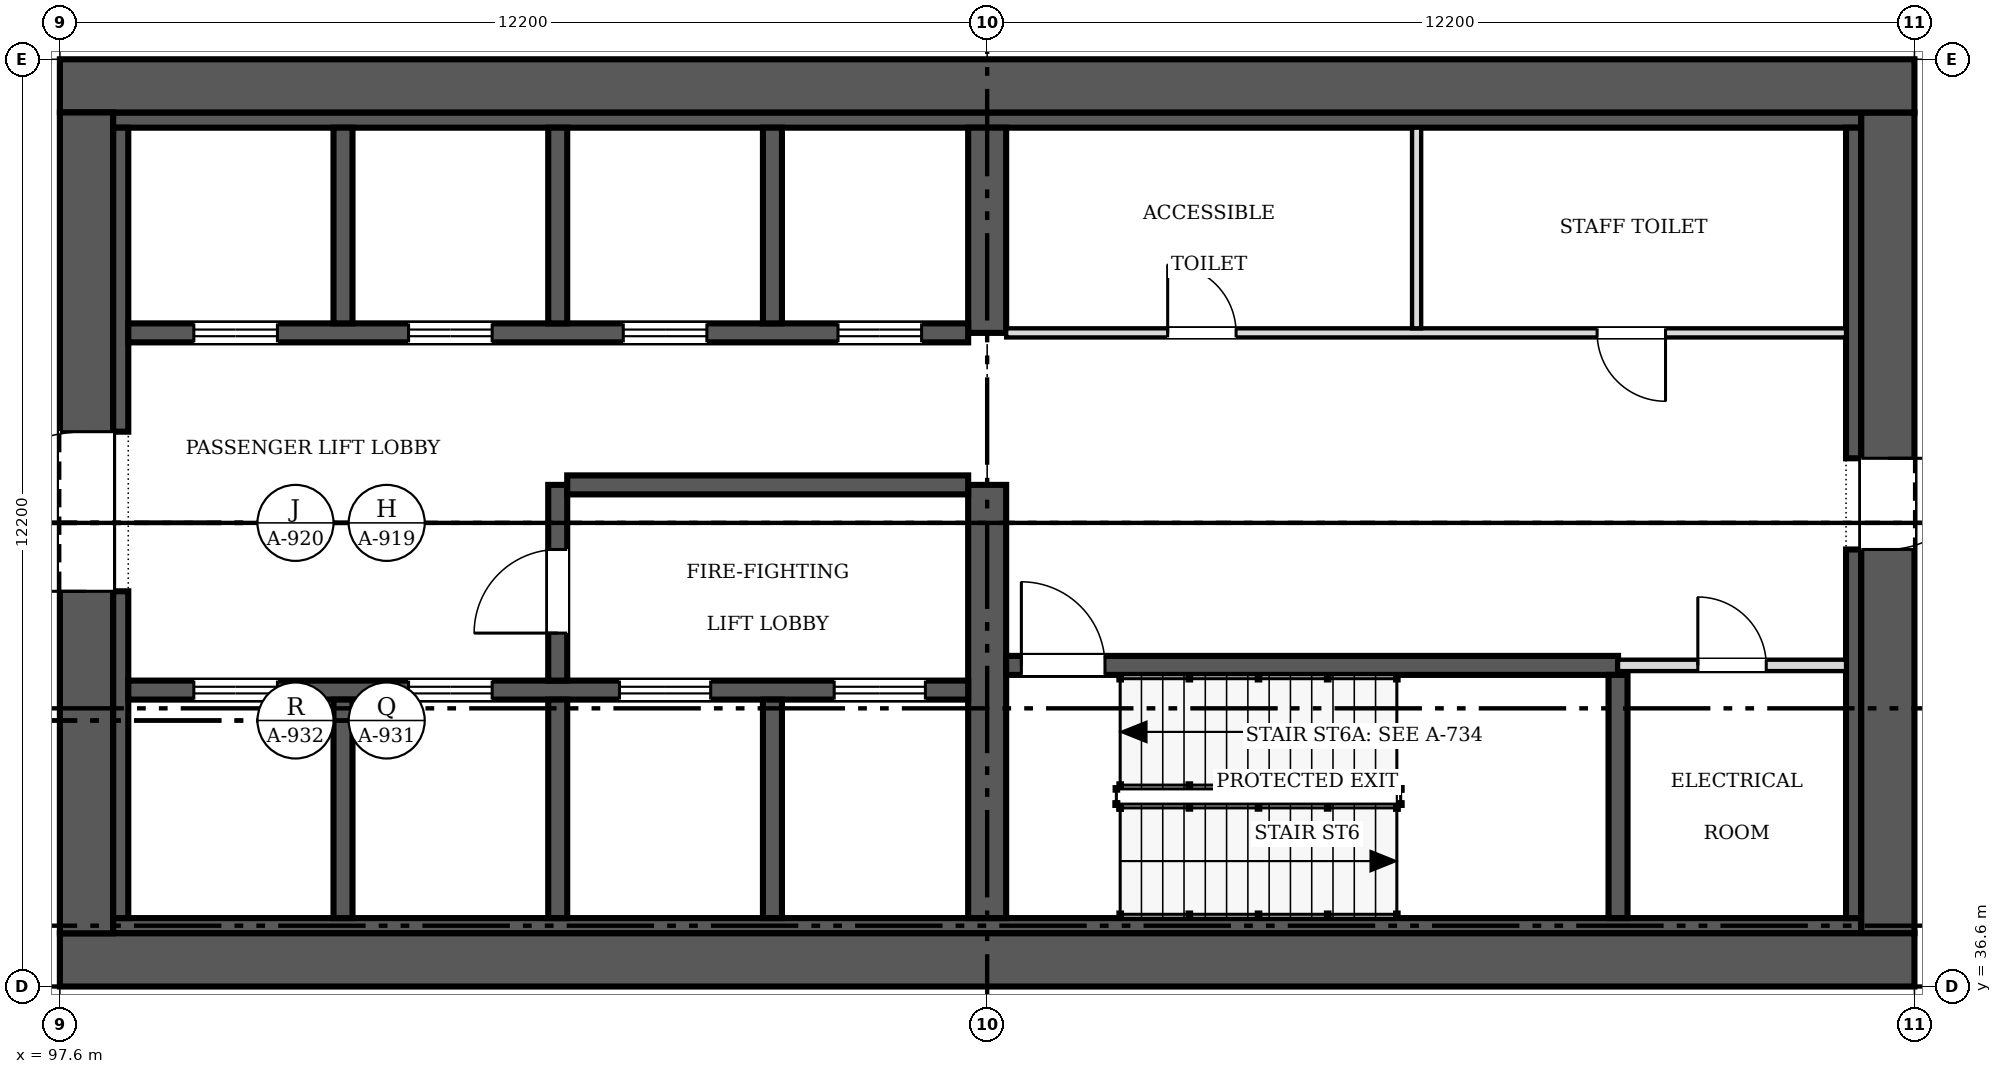
"""IFC4 building model, lengths in metres.
Left out: names, types, materials, properties, quantities, classifications, styles, units other than length and angle.
Written with IfcOpenShell. Run it as: python <this file> out.ifc"""

import sys

from ifc_helpers import new_model, si_unit, direction, frame, frame_2d, origin, place, context, subcontext, project, spatial, rectangle, extrude, source, transform, mapped, element, fill, save


model = new_model("IFC4")
c1 = context("Model", 3, precision=1e-05, world=origin(), true_north=direction((0.0, 1.0)))
c2 = subcontext(c1, "Body", "Model", "MODEL_VIEW")
j1 = project(units=[si_unit("LENGTHUNIT", "METRE"), si_unit("PLANEANGLEUNIT", "RADIAN")], contexts=[c1])
p1 = place(None, origin())
s1 = spatial("IfcSite", under=j1, at=p1, CompositionType="ELEMENT")
p2 = place(p1, origin())
s2 = spatial("IfcBuilding", under=s1, at=p2, CompositionType="ELEMENT")
p3 = place(p2, frame((0.0, 0.0, 12.0)))
s3 = spatial("IfcBuildingStorey", under=s2, at=p3, CompositionType="ELEMENT", Elevation=12.0)
p4 = place(p3, frame((122.0, 36.95, 0.0), z_axis=(0.0, 0.0, 1.0), x_axis=(-1.0, 0.0, 0.0)))
e1 = element("IfcWall", 1, at=p4, inside=s3, PredefinedType="SHEAR", context=c2, shape_type="SweptSolid", body=[
    extrude(rectangle(XDim=24.4, YDim=0.7, at=frame_2d((12.2, 0.0))), origin(), (0.0, 0.0, 1.0), 4.8),
])
p5 = place(p3, frame((97.95, 37.3, 0.0), z_axis=(0.0, 0.0, 1.0), x_axis=(0.0, 1.0, 0.0)))
e2 = element("IfcWall", 2, at=p5, inside=s3, PredefinedType="SHEAR", context=c2, shape_type="SweptSolid", body=[
    extrude(rectangle(XDim=10.8, YDim=0.7, at=frame_2d((5.4, 0.0))), origin(), (0.0, 0.0, 1.0), 4.8),
])
m1 = source(origin(), c2, "Body", "SweptSolid", [
    extrude(rectangle(XDim=2.1, YDim=2.4, at=frame_2d((1.05, 1.2))), frame((0.0, 0.36, 0.0), z_axis=(0.0, -1.0, 0.0), x_axis=(1.0, 0.0, 0.0)), (0.0, 0.0, 1.0), 0.72),
])
p6 = place(p5, frame((4.5, 0.0, 0.0)))
e3 = element("IfcOpeningElement", 3, at=p6, cuts=e2, PredefinedType="OPENING", context=c2, shape_type="MappedRepresentation", body=[
    mapped(m1, transform((0.0, 0.0, 0.0), scale=1.0)),
])
p7 = place(p3, frame((97.6, 48.45, 0.0), z_axis=(0.0, 0.0, 1.0), x_axis=(1.0, 0.0, 0.0)))
e4 = element("IfcWall", 4, at=p7, inside=s3, PredefinedType="SHEAR", context=c2, shape_type="SweptSolid", body=[
    extrude(rectangle(XDim=24.4, YDim=0.7, at=frame_2d((12.2, 0.0))), origin(), (0.0, 0.0, 1.0), 4.8),
])
p8 = place(p3, frame((121.65, 48.1, 0.0), z_axis=(0.0, 0.0, 1.0), x_axis=(0.0, -1.0, 0.0)))
e5 = element("IfcWall", 5, at=p8, inside=s3, PredefinedType="SHEAR", context=c2, shape_type="SweptSolid", body=[
    extrude(rectangle(XDim=10.8, YDim=0.7, at=frame_2d((5.4, 0.0))), origin(), (0.0, 0.0, 1.0), 4.8),
])
m2 = source(origin(), c2, "Body", "SweptSolid", [
    extrude(rectangle(XDim=1.2, YDim=2.1, at=frame_2d((0.6, 1.05))), frame((0.0, 0.36, 0.0), z_axis=(0.0, -1.0, 0.0), x_axis=(1.0, 0.0, 0.0)), (0.0, 0.0, 1.0), 0.72),
])
p9 = place(p8, frame((4.55, 0.0, 0.0)))
e6 = element("IfcOpeningElement", 6, at=p9, cuts=e5, PredefinedType="OPENING", context=c2, shape_type="MappedRepresentation", body=[
    mapped(m2, transform((0.0, 0.0, 0.0), scale=1.0)),
])
for number, where, z_axis, x_axis in (
    (7, (98.3, 37.4, 0.0), (0.0, 0.0, 1.0), (1.0, 0.0, 0.0)),
    (8, (98.3, 48.0, 0.0), (0.0, 0.0, 1.0), (1.0, 0.0, 0.0)),
):
    element("IfcWall", number, at=place(p3, frame(where, z_axis=z_axis, x_axis=x_axis)), inside=s3, PredefinedType="SOLIDWALL", context=c2, shape_type="SweptSolid", body=[
        extrude(rectangle(XDim=23.0, YDim=0.2, at=frame_2d((11.5, 0.0))), origin(), (0.0, 0.0, 1.0), 4.8),
    ])
p10 = place(p3, frame((98.4, 37.5, 0.0), z_axis=(0.0, 0.0, 1.0), x_axis=(0.0, 1.0, 0.0)))
e9 = element("IfcWall", 9, at=p10, inside=s3, PredefinedType="SOLIDWALL", context=c2, shape_type="SweptSolid", body=[
    extrude(rectangle(XDim=4.3, YDim=0.2, at=frame_2d((2.15, 0.0))), origin(), (0.0, 0.0, 1.0), 4.8),
])
p11 = place(p3, frame((98.4, 43.9, 0.0), z_axis=(0.0, 0.0, 1.0), x_axis=(0.0, 1.0, 0.0)))
e10 = element("IfcWall", 10, at=p11, inside=s3, PredefinedType="SOLIDWALL", context=c2, shape_type="SweptSolid", body=[
    extrude(rectangle(XDim=4.0, YDim=0.2, at=frame_2d((2.0, 0.0))), origin(), (0.0, 0.0, 1.0), 4.8),
])
p12 = place(p3, frame((121.2, 37.5, 0.0), z_axis=(0.0, 0.0, 1.0), x_axis=(0.0, 1.0, 0.0)))
e11 = element("IfcWall", 11, at=p12, inside=s3, PredefinedType="SOLIDWALL", context=c2, shape_type="SweptSolid", body=[
    extrude(rectangle(XDim=4.85, YDim=0.2, at=frame_2d((2.425, 0.0))), origin(), (0.0, 0.0, 1.0), 4.8),
])
p13 = place(p3, frame((121.2, 43.55, 0.0), z_axis=(0.0, 0.0, 1.0), x_axis=(0.0, 1.0, 0.0)))
e12 = element("IfcWall", 12, at=p13, inside=s3, PredefinedType="SOLIDWALL", context=c2, shape_type="SweptSolid", body=[
    extrude(rectangle(XDim=4.35, YDim=0.2, at=frame_2d((2.175, 0.0))), origin(), (0.0, 0.0, 1.0), 4.8),
])
p14 = place(p3, frame((109.8, 37.5, 0.0), z_axis=(0.0, 0.0, 1.0), x_axis=(0.0, 1.0, 0.0)))
e13 = element("IfcWall", 13, at=p14, inside=s3, PredefinedType="SHEAR", context=c2, shape_type="SweptSolid", body=[
    extrude(rectangle(XDim=5.7, YDim=0.5, at=frame_2d((2.85, 0.0))), origin(), (0.0, 0.0, 1.0), 4.8),
])
p15 = place(p3, frame((109.8, 45.2, 0.0), z_axis=(0.0, 0.0, 1.0), x_axis=(0.0, 1.0, 0.0)))
e14 = element("IfcWall", 14, at=p15, inside=s3, PredefinedType="SHEAR", context=c2, shape_type="SweptSolid", body=[
    extrude(rectangle(XDim=2.7, YDim=0.5, at=frame_2d((1.35, 0.0))), origin(), (0.0, 0.0, 1.0), 4.8),
])
p16 = place(p3, frame((98.5, 40.5, 0.0), z_axis=(0.0, 0.0, 1.0), x_axis=(1.0, 0.0, 0.0)))
e15 = element("IfcWall", 15, at=p16, inside=s3, PredefinedType="SOLIDWALL", context=c2, shape_type="SweptSolid", body=[
    extrude(rectangle(XDim=11.05, YDim=0.25, at=frame_2d((5.525, 0.0))), origin(), (0.0, 0.0, 1.0), 4.8),
])
m3 = source(origin(), c2, "Body", "SweptSolid", [
    extrude(rectangle(XDim=1.1, YDim=2.1, at=frame_2d((0.55, 1.05))), frame((0.0, 0.135, 0.0), z_axis=(0.0, -1.0, 0.0), x_axis=(1.0, 0.0, 0.0)), (0.0, 0.0, 1.0), 0.27),
])
p17 = place(p16, frame((0.863, 0.0, 0.0)))
e16 = element("IfcOpeningElement", 16, at=p17, cuts=e15, PredefinedType="OPENING", context=c2, shape_type="MappedRepresentation", body=[
    mapped(m3, transform((0.0, 0.0, 0.0), scale=1.0)),
])
p18 = place(p16, frame((3.688, 0.0, 0.0)))
e17 = element("IfcOpeningElement", 17, at=p18, cuts=e15, PredefinedType="OPENING", context=c2, shape_type="MappedRepresentation", body=[
    mapped(m3, transform((0.0, 0.0, 0.0), scale=1.0)),
])
m4 = source(origin(), c2, "Body", "SweptSolid", [
    extrude(rectangle(XDim=1.2, YDim=2.1, at=frame_2d((0.6, 1.05))), frame((0.0, 0.135, 0.0), z_axis=(0.0, -1.0, 0.0), x_axis=(1.0, 0.0, 0.0)), (0.0, 0.0, 1.0), 0.27),
])
p19 = place(p16, frame((6.462, 0.0, 0.0)))
e18 = element("IfcOpeningElement", 18, at=p19, cuts=e15, PredefinedType="OPENING", context=c2, shape_type="MappedRepresentation", body=[
    mapped(m4, transform((0.0, 0.0, 0.0), scale=1.0)),
])
p20 = place(p16, frame((9.288, 0.0, 0.0)))
e19 = element("IfcOpeningElement", 19, at=p20, cuts=e15, PredefinedType="OPENING", context=c2, shape_type="MappedRepresentation", body=[
    mapped(m4, transform((0.0, 0.0, 0.0), scale=1.0)),
])
p21 = place(p3, frame((109.55, 45.2, 0.0), z_axis=(0.0, 0.0, 1.0), x_axis=(-1.0, 0.0, 0.0)))
e20 = element("IfcWall", 20, at=p21, inside=s3, PredefinedType="SOLIDWALL", context=c2, shape_type="SweptSolid", body=[
    extrude(rectangle(XDim=11.05, YDim=0.25, at=frame_2d((5.525, 0.0))), origin(), (0.0, 0.0, 1.0), 4.8),
])
p22 = place(p21, frame((9.087, 0.0, 0.0)))
e21 = element("IfcOpeningElement", 21, at=p22, cuts=e20, PredefinedType="OPENING", context=c2, shape_type="MappedRepresentation", body=[
    mapped(m3, transform((0.0, 0.0, 0.0), scale=1.0)),
])
p23 = place(p21, frame((6.262, 0.0, 0.0)))
e22 = element("IfcOpeningElement", 22, at=p23, cuts=e20, PredefinedType="OPENING", context=c2, shape_type="MappedRepresentation", body=[
    mapped(m3, transform((0.0, 0.0, 0.0), scale=1.0)),
])
p24 = place(p21, frame((3.438, 0.0, 0.0)))
e23 = element("IfcOpeningElement", 23, at=p24, cuts=e20, PredefinedType="OPENING", context=c2, shape_type="MappedRepresentation", body=[
    mapped(m3, transform((0.0, 0.0, 0.0), scale=1.0)),
])
p25 = place(p21, frame((0.613, 0.0, 0.0)))
e24 = element("IfcOpeningElement", 24, at=p25, cuts=e20, PredefinedType="OPENING", context=c2, shape_type="MappedRepresentation", body=[
    mapped(m3, transform((0.0, 0.0, 0.0), scale=1.0)),
])
p26 = place(p3, frame((118.1, 40.825, 0.0), z_axis=(0.0, 0.0, 1.0), x_axis=(-1.0, 0.0, 0.0)))
e25 = element("IfcWall", 25, at=p26, inside=s3, PredefinedType="SOLIDWALL", context=c2, shape_type="SweptSolid", body=[
    extrude(rectangle(XDim=8.05, YDim=0.25, at=frame_2d((4.025, 0.0))), origin(), (0.0, 0.0, 1.0), 4.8),
])
p27 = place(p26, frame((6.75, 0.0, 0.0)))
e26 = element("IfcOpeningElement", 26, at=p27, cuts=e25, PredefinedType="OPENING", context=c2, shape_type="MappedRepresentation", body=[
    mapped(m3, transform((0.0, 0.0, 0.0), scale=1.0)),
])
p28 = place(p3, frame((104.15, 37.5, 0.0), z_axis=(0.0, 0.0, 1.0), x_axis=(0.0, 1.0, 0.0)))
e27 = element("IfcWall", 27, at=p28, inside=s3, PredefinedType="SOLIDWALL", context=c2, shape_type="SweptSolid", body=[
    extrude(rectangle(XDim=2.875, YDim=0.25, at=frame_2d((1.438, 0.0))), origin(), (0.0, 0.0, 1.0), 4.8),
])
p29 = place(p3, frame((104.15, 43.2, 0.0), z_axis=(0.0, 0.0, 1.0), x_axis=(0.0, -1.0, 0.0)))
e28 = element("IfcWall", 28, at=p29, inside=s3, PredefinedType="SOLIDWALL", context=c2, shape_type="SweptSolid", body=[
    extrude(rectangle(XDim=2.575, YDim=0.25, at=frame_2d((1.288, 0.0))), origin(), (0.0, 0.0, 1.0), 4.8),
])
p30 = place(p29, frame((0.85, 0.0, 0.0)))
e29 = element("IfcOpeningElement", 29, at=p30, cuts=e28, PredefinedType="OPENING", context=c2, shape_type="MappedRepresentation", body=[
    mapped(m3, transform((0.0, 0.0, 0.0), scale=1.0)),
])
p31 = place(p3, frame((104.275, 43.2, 0.0), z_axis=(0.0, 0.0, 1.0), x_axis=(1.0, 0.0, 0.0)))
e30 = element("IfcWall", 30, at=p31, inside=s3, PredefinedType="SOLIDWALL", context=c2, shape_type="SweptSolid", body=[
    extrude(rectangle(XDim=5.275, YDim=0.25, at=frame_2d((2.638, 0.0))), origin(), (0.0, 0.0, 1.0), 4.8),
])
p32 = place(p3, frame((118.1, 37.5, 0.0), z_axis=(0.0, 0.0, 1.0), x_axis=(0.0, 1.0, 0.0)))
e31 = element("IfcWall", 31, at=p32, inside=s3, PredefinedType="SOLIDWALL", context=c2, shape_type="SweptSolid", body=[
    extrude(rectangle(XDim=3.2, YDim=0.25, at=frame_2d((1.6, 0.0))), origin(), (0.0, 0.0, 1.0), 4.8),
])
for number, where, z_axis, x_axis in (
    (32, (101.325, 37.5, 0.0), (0.0, 0.0, 1.0), (0.0, 1.0, 0.0)),
    (33, (106.975, 37.5, 0.0), (0.0, 0.0, 1.0), (0.0, 1.0, 0.0)),
):
    element("IfcWall", number, at=place(p3, frame(where, z_axis=z_axis, x_axis=x_axis)), inside=s3, PredefinedType="SOLIDWALL", context=c2, shape_type="SweptSolid", body=[
        extrude(rectangle(XDim=2.875, YDim=0.25, at=frame_2d((1.438, 0.0))), origin(), (0.0, 0.0, 1.0), 4.8),
    ])
for number, where, z_axis, x_axis in (
    (34, (101.325, 45.325, 0.0), (0.0, 0.0, 1.0), (0.0, 1.0, 0.0)),
    (35, (104.15, 45.325, 0.0), (0.0, 0.0, 1.0), (0.0, 1.0, 0.0)),
    (36, (106.975, 45.325, 0.0), (0.0, 0.0, 1.0), (0.0, 1.0, 0.0)),
):
    element("IfcWall", number, at=place(p3, frame(where, z_axis=z_axis, x_axis=x_axis)), inside=s3, PredefinedType="SOLIDWALL", context=c2, shape_type="SweptSolid", body=[
        extrude(rectangle(XDim=2.575, YDim=0.25, at=frame_2d((1.288, 0.0))), origin(), (0.0, 0.0, 1.0), 4.8),
    ])
p33 = place(p3, frame((110.05, 45.2, 0.0), z_axis=(0.0, 0.0, 1.0), x_axis=(1.0, 0.0, 0.0)))
e37 = element("IfcWall", 37, at=p33, inside=s3, PredefinedType="PARTITIONING", context=c2, shape_type="SweptSolid", body=[
    extrude(rectangle(XDim=11.05, YDim=0.12, at=frame_2d((5.525, 0.0))), origin(), (0.0, 0.0, 1.0), 4.6),
])
m5 = source(origin(), c2, "Body", "SweptSolid", [
    extrude(rectangle(XDim=0.9, YDim=2.1, at=frame_2d((0.45, 1.05))), frame((0.0, 0.07, 0.0), z_axis=(0.0, -1.0, 0.0), x_axis=(1.0, 0.0, 0.0)), (0.0, 0.0, 1.0), 0.14),
])
p34 = place(p33, frame((2.125, 0.0, 0.0)))
e38 = element("IfcOpeningElement", 38, at=p34, cuts=e37, PredefinedType="OPENING", context=c2, shape_type="MappedRepresentation", body=[
    mapped(m5, transform((0.0, 0.0, 0.0), scale=1.0)),
])
p35 = place(p33, frame((7.775, 0.0, 0.0)))
e39 = element("IfcOpeningElement", 39, at=p35, cuts=e37, PredefinedType="OPENING", context=c2, shape_type="MappedRepresentation", body=[
    mapped(m5, transform((0.0, 0.0, 0.0), scale=1.0)),
])
p36 = place(p3, frame((121.1, 40.825, 0.0), z_axis=(0.0, 0.0, 1.0), x_axis=(-1.0, 0.0, 0.0)))
e40 = element("IfcWall", 40, at=p36, inside=s3, PredefinedType="PARTITIONING", context=c2, shape_type="SweptSolid", body=[
    extrude(rectangle(XDim=3.0, YDim=0.15, at=frame_2d((1.5, 0.0))), origin(), (0.0, 0.0, 1.0), 4.6),
])
m6 = source(origin(), c2, "Body", "SweptSolid", [
    extrude(rectangle(XDim=0.9, YDim=2.1, at=frame_2d((0.45, 1.05))), frame((0.0, 0.085, 0.0), z_axis=(0.0, -1.0, 0.0), x_axis=(1.0, 0.0, 0.0)), (0.0, 0.0, 1.0), 0.17),
])
p37 = place(p36, frame((1.05, 0.0, 0.0)))
e41 = element("IfcOpeningElement", 41, at=p37, cuts=e40, PredefinedType="OPENING", context=c2, shape_type="MappedRepresentation", body=[
    mapped(m6, transform((0.0, 0.0, 0.0), scale=1.0)),
])
p38 = place(p3, frame((115.45, 45.26, 0.0), z_axis=(0.0, 0.0, 1.0), x_axis=(0.0, 1.0, 0.0)))
e42 = element("IfcWall", 42, at=p38, inside=s3, PredefinedType="PARTITIONING", context=c2, shape_type="SweptSolid", body=[
    extrude(rectangle(XDim=2.64, YDim=0.12, at=frame_2d((1.32, 0.0))), origin(), (0.0, 0.0, 1.0), 4.6),
])
m7 = source(origin(), c2, "Body", "SweptSolid", [
    extrude(rectangle(XDim=2.1, YDim=2.4, at=frame_2d((1.05, 1.2))), frame((0.0, 0.025, 0.0), z_axis=(0.0, -1.0, 0.0), x_axis=(1.0, 0.0, 0.0)), (0.0, 0.0, 1.0), 0.05),
])
p39 = place(p6, origin())
e43 = element("IfcDoor", 43, at=p39, inside=s3, OperationType="DOUBLE_DOOR_SINGLE_SWING", PredefinedType="DOOR", context=c2, shape_type="MappedRepresentation", body=[
    mapped(m7, transform((0.0, 0.0, 0.0), scale=1.0)),
])
fill(e3, e43)
m8 = source(origin(), c2, "Body", "SweptSolid", [
    extrude(rectangle(XDim=1.2, YDim=2.1, at=frame_2d((0.6, 1.05))), frame((0.0, 0.025, 0.0), z_axis=(0.0, -1.0, 0.0), x_axis=(1.0, 0.0, 0.0)), (0.0, 0.0, 1.0), 0.05),
])
p40 = place(p9, origin())
e44 = element("IfcDoor", 44, at=p40, inside=s3, OperationType="SINGLE_SWING_LEFT", PredefinedType="DOOR", context=c2, shape_type="MappedRepresentation", body=[
    mapped(m8, transform((0.0, 0.0, 0.0), scale=1.0)),
])
fill(e6, e44)
m9 = source(origin(), c2, "Body", "SweptSolid", [
    extrude(rectangle(XDim=1.1, YDim=2.1, at=frame_2d((0.55, 1.05))), frame((0.0, 0.025, 0.0), z_axis=(0.0, -1.0, 0.0), x_axis=(1.0, 0.0, 0.0)), (0.0, 0.0, 1.0), 0.05),
])
p41 = place(p17, origin())
e45 = element("IfcDoor", 45, at=p41, inside=s3, OperationType="DOUBLE_DOOR_SLIDING", PredefinedType="DOOR", context=c2, shape_type="MappedRepresentation", body=[
    mapped(m9, transform((0.0, 0.0, 0.0), scale=1.0)),
])
fill(e16, e45)
p42 = place(p18, origin())
e46 = element("IfcDoor", 46, at=p42, inside=s3, OperationType="DOUBLE_DOOR_SLIDING", PredefinedType="DOOR", context=c2, shape_type="MappedRepresentation", body=[
    mapped(m9, transform((0.0, 0.0, 0.0), scale=1.0)),
])
fill(e17, e46)
p43 = place(p19, origin())
e47 = element("IfcDoor", 47, at=p43, inside=s3, OperationType="DOUBLE_DOOR_SLIDING", PredefinedType="DOOR", context=c2, shape_type="MappedRepresentation", body=[
    mapped(m8, transform((0.0, 0.0, 0.0), scale=1.0)),
])
fill(e18, e47)
p44 = place(p20, origin())
e48 = element("IfcDoor", 48, at=p44, inside=s3, OperationType="DOUBLE_DOOR_SLIDING", PredefinedType="DOOR", context=c2, shape_type="MappedRepresentation", body=[
    mapped(m8, transform((0.0, 0.0, 0.0), scale=1.0)),
])
fill(e19, e48)
p45 = place(p22, origin())
e49 = element("IfcDoor", 49, at=p45, inside=s3, OperationType="DOUBLE_DOOR_SLIDING", PredefinedType="DOOR", context=c2, shape_type="MappedRepresentation", body=[
    mapped(m9, transform((0.0, 0.0, 0.0), scale=1.0)),
])
fill(e21, e49)
p46 = place(p23, origin())
e50 = element("IfcDoor", 50, at=p46, inside=s3, OperationType="DOUBLE_DOOR_SLIDING", PredefinedType="DOOR", context=c2, shape_type="MappedRepresentation", body=[
    mapped(m9, transform((0.0, 0.0, 0.0), scale=1.0)),
])
fill(e22, e50)
p47 = place(p24, origin())
e51 = element("IfcDoor", 51, at=p47, inside=s3, OperationType="DOUBLE_DOOR_SLIDING", PredefinedType="DOOR", context=c2, shape_type="MappedRepresentation", body=[
    mapped(m9, transform((0.0, 0.0, 0.0), scale=1.0)),
])
fill(e23, e51)
p48 = place(p25, origin())
e52 = element("IfcDoor", 52, at=p48, inside=s3, OperationType="DOUBLE_DOOR_SLIDING", PredefinedType="DOOR", context=c2, shape_type="MappedRepresentation", body=[
    mapped(m9, transform((0.0, 0.0, 0.0), scale=1.0)),
])
fill(e24, e52)
p49 = place(p27, origin())
e53 = element("IfcDoor", 53, at=p49, inside=s3, OperationType="SINGLE_SWING_RIGHT", PredefinedType="DOOR", context=c2, shape_type="MappedRepresentation", body=[
    mapped(m9, transform((0.0, 0.0, 0.0), scale=1.0)),
])
fill(e26, e53)
p50 = place(p30, origin())
e54 = element("IfcDoor", 54, at=p50, inside=s3, OperationType="SINGLE_SWING_RIGHT", PredefinedType="DOOR", context=c2, shape_type="MappedRepresentation", body=[
    mapped(m9, transform((0.0, 0.0, 0.0), scale=1.0)),
])
fill(e29, e54)
m10 = source(origin(), c2, "Body", "SweptSolid", [
    extrude(rectangle(XDim=0.9, YDim=2.1, at=frame_2d((0.45, 1.05))), frame((0.0, 0.025, 0.0), z_axis=(0.0, -1.0, 0.0), x_axis=(1.0, 0.0, 0.0)), (0.0, 0.0, 1.0), 0.05),
])
p51 = place(p34, origin())
e55 = element("IfcDoor", 55, at=p51, inside=s3, OperationType="SINGLE_SWING_LEFT", PredefinedType="DOOR", context=c2, shape_type="MappedRepresentation", body=[
    mapped(m10, transform((0.0, 0.0, 0.0), scale=1.0)),
])
fill(e38, e55)
p52 = place(p35, origin())
e56 = element("IfcDoor", 56, at=p52, inside=s3, OperationType="SINGLE_SWING_RIGHT", PredefinedType="DOOR", context=c2, shape_type="MappedRepresentation", body=[
    mapped(m10, transform((0.0, 0.0, 0.0), scale=1.0)),
])
fill(e39, e56)
p53 = place(p37, origin())
e57 = element("IfcDoor", 57, at=p53, inside=s3, OperationType="SINGLE_SWING_RIGHT", PredefinedType="DOOR", context=c2, shape_type="MappedRepresentation", body=[
    mapped(m10, transform((0.0, 0.0, 0.0), scale=1.0)),
])
fill(e41, e57)
save(model, sys.argv[1])
